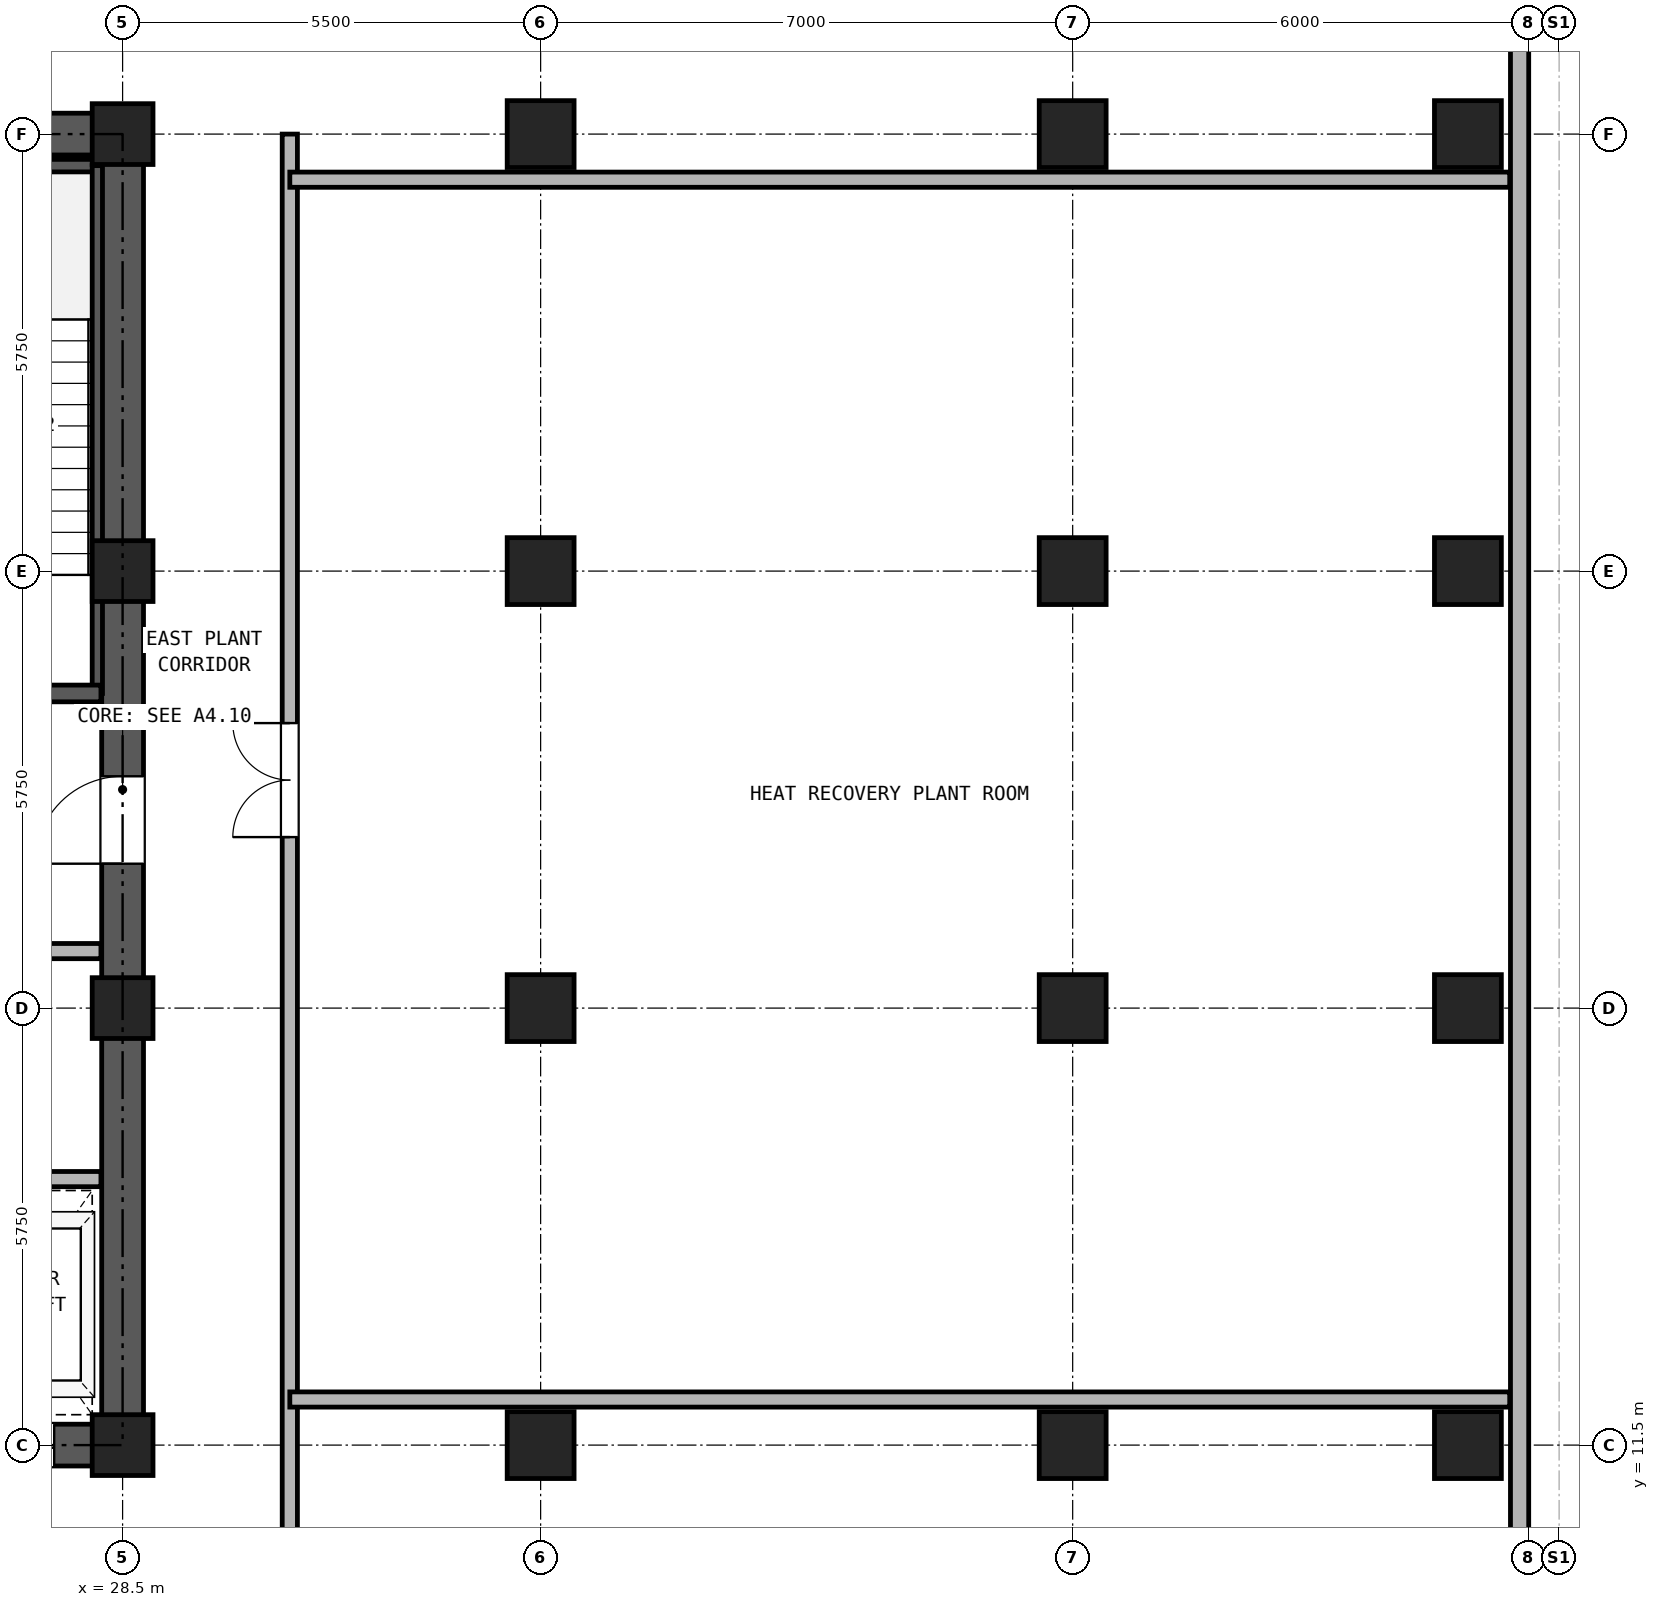
"""IFC4 building model, lengths in metres.
Left out: names, types, materials, properties, quantities, classifications, styles, units other than length and angle.
Written with IfcOpenShell. Run it as: python <this file> out.ifc"""

import sys

from ifc_helpers import new_model, si_unit, direction, frame, frame_2d, origin, origin_2d, place, context, subcontext, project, spatial, rectangle, hollow_rectangle, extrude, source, transform, mapped, element, fill, save


model = new_model("IFC4")
c1 = context("Model", 3, precision=1e-05, world=origin(), true_north=direction((0.0, 1.0)))
c2 = subcontext(c1, "Body", "Model", "MODEL_VIEW")
j1 = project(units=[si_unit("LENGTHUNIT", "METRE"), si_unit("PLANEANGLEUNIT", "RADIAN")], contexts=[c1])
p1 = place(None, origin())
s1 = spatial("IfcSite", under=j1, at=p1, CompositionType="ELEMENT")
p2 = place(p1, origin())
s2 = spatial("IfcBuilding", under=s1, at=p2, CompositionType="ELEMENT")
p3 = place(p2, frame((0.0, 0.0, 143.9)))
s3 = spatial("IfcBuildingStorey", under=s2, at=p3, CompositionType="ELEMENT", Elevation=143.9)
m1 = source(origin(), c2, "Body", "SweptSolid", [
    extrude(hollow_rectangle(XDim=0.88, YDim=0.88, WallThickness=0.05, at=origin_2d()), origin(), (0.0, 0.0, 1.0), 4.25),
])
for number, where, z_axis, x_axis in (
    (1, (46.2, 11.5, 0.0), (0.0, 0.0, 1.0), (1.0, 0.0, 0.0)),
    (2, (46.2, 17.25, 0.0), (0.0, 0.0, 1.0), (1.0, 0.0, 0.0)),
    (3, (46.2, 23.0, 0.0), (0.0, 0.0, 1.0), (1.0, 0.0, 0.0)),
    (4, (46.2, 28.75, 0.0), (0.0, 0.0, 1.0), (1.0, 0.0, 0.0)),
):
    element("IfcColumn", number, at=place(p3, frame(where, z_axis=z_axis, x_axis=x_axis)), inside=s3, PredefinedType="COLUMN", context=c2, shape_type="MappedRepresentation", body=[
        mapped(m1, transform((0.0, 0.0, 0.0), x_axis=(1.0, 0.0, 0.0), y_axis=(0.0, 1.0, 0.0), z_axis=(0.0, 0.0, 1.0), scale=1.0)),
    ])
m2 = source(origin(), c2, "Body", "SweptSolid", [
    extrude(hollow_rectangle(XDim=0.8, YDim=0.8, WallThickness=0.045, at=origin_2d()), origin(), (0.0, 0.0, 1.0), 4.25),
])
for number, where, z_axis, x_axis in (
    (5, (28.5, 11.5, 0.0), (0.0, 0.0, 1.0), (1.0, 0.0, 0.0)),
    (6, (28.5, 17.25, 0.0), (0.0, 0.0, 1.0), (1.0, 0.0, 0.0)),
    (7, (28.5, 23.0, 0.0), (0.0, 0.0, 1.0), (1.0, 0.0, 0.0)),
    (8, (28.5, 28.75, 0.0), (0.0, 0.0, 1.0), (1.0, 0.0, 0.0)),
):
    element("IfcColumn", number, at=place(p3, frame(where, z_axis=z_axis, x_axis=x_axis)), inside=s3, PredefinedType="COLUMN", context=c2, shape_type="MappedRepresentation", body=[
        mapped(m2, transform((0.0, 0.0, 0.0), x_axis=(1.0, 0.0, 0.0), y_axis=(0.0, 1.0, 0.0), z_axis=(0.0, 0.0, 1.0), scale=1.0)),
    ])
for number, where, z_axis, x_axis in (
    (9, (34.0, 11.5, 0.0), (0.0, 0.0, 1.0), (1.0, 0.0, 0.0)),
    (10, (34.0, 17.25, 0.0), (0.0, 0.0, 1.0), (1.0, 0.0, 0.0)),
    (11, (34.0, 23.0, 0.0), (0.0, 0.0, 1.0), (1.0, 0.0, 0.0)),
    (12, (34.0, 28.75, 0.0), (0.0, 0.0, 1.0), (1.0, 0.0, 0.0)),
    (13, (41.0, 11.5, 0.0), (0.0, 0.0, 1.0), (1.0, 0.0, 0.0)),
    (14, (41.0, 17.25, 0.0), (0.0, 0.0, 1.0), (1.0, 0.0, 0.0)),
    (15, (41.0, 23.0, 0.0), (0.0, 0.0, 1.0), (1.0, 0.0, 0.0)),
    (16, (41.0, 28.75, 0.0), (0.0, 0.0, 1.0), (1.0, 0.0, 0.0)),
):
    element("IfcColumn", number, at=place(p3, frame(where, z_axis=z_axis, x_axis=x_axis)), inside=s3, PredefinedType="COLUMN", context=c2, shape_type="MappedRepresentation", body=[
        mapped(m1, transform((0.0, 0.0, 0.0), x_axis=(1.0, 0.0, 0.0), y_axis=(0.0, 1.0, 0.0), z_axis=(0.0, 0.0, 1.0), scale=1.0)),
    ])
p4 = place(p3, frame((46.88, 3.8, 0.0), z_axis=(0.0, 0.0, 1.0), x_axis=(0.0, 1.0, 0.0)))
e17 = element("IfcWall", 17, at=p4, inside=s3, PredefinedType="SOLIDWALL", context=c2, shape_type="SweptSolid", body=[
    extrude(rectangle(XDim=27.7, YDim=0.24, at=frame_2d((13.85, 0.0))), origin(), (0.0, 0.0, 1.0), 4.25),
])
p5 = place(p3, frame((18.225, 11.5, 0.0), z_axis=(0.0, 0.0, 1.0), x_axis=(1.0, 0.0, 0.0)))
e18 = element("IfcWall", 18, at=p5, inside=s3, PredefinedType="SHEAR", context=c2, shape_type="SweptSolid", body=[
    extrude(rectangle(XDim=10.55, YDim=0.55, at=frame_2d((5.275, 0.0))), origin(), (0.0, 0.0, 1.0), 4.25),
])
p6 = place(p5, frame((2.375, 0.0, 0.0)))
e19 = element("IfcOpeningElement", 19, at=p6, cuts=e18, PredefinedType="OPENING", context=c2, shape_type="SweptSolid", body=[
    extrude(rectangle(XDim=0.95, YDim=2.15, at=frame_2d((0.475, 1.075))), frame((0.0, 0.285, 0.0), z_axis=(0.0, -1.0, 0.0), x_axis=(1.0, 0.0, 0.0)), (0.0, 0.0, 1.0), 0.57),
])
p7 = place(p5, frame((5.875, 0.0, 0.0)))
e20 = element("IfcOpeningElement", 20, at=p7, cuts=e18, PredefinedType="OPENING", context=c2, shape_type="SweptSolid", body=[
    extrude(rectangle(XDim=1.1, YDim=2.25, at=frame_2d((0.55, 1.125))), frame((0.0, 0.285, 0.0), z_axis=(0.0, -1.0, 0.0), x_axis=(1.0, 0.0, 0.0)), (0.0, 0.0, 1.0), 0.57),
])
p8 = place(p5, frame((8.275, 0.0, 0.0)))
e21 = element("IfcOpeningElement", 21, at=p8, cuts=e18, PredefinedType="OPENING", context=c2, shape_type="SweptSolid", body=[
    extrude(rectangle(XDim=1.1, YDim=2.25, at=frame_2d((0.55, 1.125))), frame((0.0, 0.285, 0.0), z_axis=(0.0, -1.0, 0.0), x_axis=(1.0, 0.0, 0.0)), (0.0, 0.0, 1.0), 0.57),
])
p9 = place(p3, frame((18.225, 28.75, 0.0), z_axis=(0.0, 0.0, 1.0), x_axis=(1.0, 0.0, 0.0)))
e22 = element("IfcWall", 22, at=p9, inside=s3, PredefinedType="SHEAR", context=c2, shape_type="SweptSolid", body=[
    extrude(rectangle(XDim=10.55, YDim=0.55, at=frame_2d((5.275, 0.0))), origin(), (0.0, 0.0, 1.0), 4.25),
])
p10 = place(p9, frame((4.155, 0.0, 0.0)))
e23 = element("IfcOpeningElement", 23, at=p10, cuts=e22, PredefinedType="OPENING", context=c2, shape_type="SweptSolid", body=[
    extrude(rectangle(XDim=0.9, YDim=2.05, at=frame_2d((0.45, 1.025))), frame((0.0, 0.285, 0.0), z_axis=(0.0, -1.0, 0.0), x_axis=(1.0, 0.0, 0.0)), (0.0, 0.0, 1.0), 0.57),
])
p11 = place(p9, frame((5.695, 0.0, 0.0)))
e24 = element("IfcOpeningElement", 24, at=p11, cuts=e22, PredefinedType="OPENING", context=c2, shape_type="SweptSolid", body=[
    extrude(rectangle(XDim=0.9, YDim=2.05, at=frame_2d((0.45, 1.025))), frame((0.0, 0.285, 0.0), z_axis=(0.0, -1.0, 0.0), x_axis=(1.0, 0.0, 0.0)), (0.0, 0.0, 1.0), 0.57),
])
p12 = place(p3, frame((28.5, 11.775, 0.0), z_axis=(0.0, 0.0, 1.0), x_axis=(0.0, 1.0, 0.0)))
e25 = element("IfcWall", 25, at=p12, inside=s3, PredefinedType="SHEAR", context=c2, shape_type="SweptSolid", body=[
    extrude(rectangle(XDim=16.7, YDim=0.55, at=frame_2d((8.35, 0.0))), origin(), (0.0, 0.0, 1.0), 4.25),
])
p13 = place(p12, frame((7.375, 0.0, 0.0)))
e26 = element("IfcOpeningElement", 26, at=p13, cuts=e25, PredefinedType="OPENING", context=c2, shape_type="SweptSolid", body=[
    extrude(rectangle(XDim=1.15, YDim=2.2, at=frame_2d((0.575, 1.1))), frame((0.0, 0.285, 0.0), z_axis=(0.0, -1.0, 0.0), x_axis=(1.0, 0.0, 0.0)), (0.0, 0.0, 1.0), 0.57),
])
p14 = place(p3, frame((25.13, 28.335, 0.0), z_axis=(0.0, 0.0, 1.0), x_axis=(1.0, 0.0, 0.0)))
e27 = element("IfcWall", 27, at=p14, inside=s3, PredefinedType="PARTITIONING", context=c2, shape_type="SweptSolid", body=[
    extrude(rectangle(XDim=3.085, YDim=0.165, at=frame_2d((1.542, 0.0))), origin(), (0.0, 0.0, 1.0), 4.25),
])
p15 = place(p3, frame((28.167, 21.39, 0.0), z_axis=(0.0, 0.0, 1.0), x_axis=(0.0, 1.0, 0.0)))
e28 = element("IfcWall", 28, at=p15, inside=s3, PredefinedType="PARTITIONING", context=c2, shape_type="SweptSolid", body=[
    extrude(rectangle(XDim=6.945, YDim=0.135, at=frame_2d((3.473, 0.0))), origin(), (0.0, 0.0, 1.0), 4.25),
])
p16 = place(p3, frame((25.13, 21.39, 0.0), z_axis=(0.0, 0.0, 1.0), x_axis=(1.0, 0.0, 0.0)))
e29 = element("IfcWall", 29, at=p16, inside=s3, PredefinedType="SOLIDWALL", context=c2, shape_type="SweptSolid", body=[
    extrude(rectangle(XDim=3.085, YDim=0.22, at=frame_2d((1.542, 0.0))), origin(), (0.0, 0.0, 1.0), 4.25),
])
p17 = place(p16, frame((0.92, 0.0, 0.0)))
e30 = element("IfcOpeningElement", 30, at=p17, cuts=e29, PredefinedType="OPENING", context=c2, shape_type="SweptSolid", body=[
    extrude(rectangle(XDim=1.15, YDim=2.2, at=frame_2d((0.575, 1.1))), frame((0.0, 0.12, 0.0), z_axis=(0.0, -1.0, 0.0), x_axis=(1.0, 0.0, 0.0)), (0.0, 0.0, 1.0), 0.24),
])
p18 = place(p3, frame((18.785, 18.0, 0.0), z_axis=(0.0, 0.0, 1.0), x_axis=(1.0, 0.0, 0.0)))
e31 = element("IfcWall", 31, at=p18, inside=s3, PredefinedType="PARTITIONING", context=c2, shape_type="SweptSolid", body=[
    extrude(rectangle(XDim=9.43, YDim=0.2, at=frame_2d((4.715, 0.0))), origin(), (0.0, 0.0, 1.0), 4.25),
])
p19 = place(p18, frame((0.465, 0.0, 0.0)))
e32 = element("IfcOpeningElement", 32, at=p19, cuts=e31, PredefinedType="OPENING", context=c2, shape_type="SweptSolid", body=[
    extrude(rectangle(XDim=1.3, YDim=2.3, at=frame_2d((0.65, 1.15))), frame((0.0, 0.11, 0.0), z_axis=(0.0, -1.0, 0.0), x_axis=(1.0, 0.0, 0.0)), (0.0, 0.0, 1.0), 0.22),
])
p20 = place(p18, frame((2.565, 0.0, 0.0)))
e33 = element("IfcOpeningElement", 33, at=p20, cuts=e31, PredefinedType="OPENING", context=c2, shape_type="SweptSolid", body=[
    extrude(rectangle(XDim=1.3, YDim=2.3, at=frame_2d((0.65, 1.15))), frame((0.0, 0.11, 0.0), z_axis=(0.0, -1.0, 0.0), x_axis=(1.0, 0.0, 0.0)), (0.0, 0.0, 1.0), 0.22),
])
p21 = place(p18, frame((7.065, 0.0, 0.0)))
e34 = element("IfcOpeningElement", 34, at=p21, cuts=e31, PredefinedType="OPENING", context=c2, shape_type="SweptSolid", body=[
    extrude(rectangle(XDim=1.0, YDim=2.15, at=frame_2d((0.5, 1.075))), frame((0.0, 0.11, 0.0), z_axis=(0.0, -1.0, 0.0), x_axis=(1.0, 0.0, 0.0)), (0.0, 0.0, 1.0), 0.22),
])
p22 = place(p3, frame((18.785, 15.0, 0.0), z_axis=(0.0, 0.0, 1.0), x_axis=(1.0, 0.0, 0.0)))
e35 = element("IfcWall", 35, at=p22, inside=s3, PredefinedType="PARTITIONING", context=c2, shape_type="SweptSolid", body=[
    extrude(rectangle(XDim=9.43, YDim=0.2, at=frame_2d((4.715, 0.0))), origin(), (0.0, 0.0, 1.0), 4.25),
])
p23 = place(p3, frame((30.7, 8.9, 0.0), z_axis=(0.0, 0.0, 1.0), x_axis=(0.0, 1.0, 0.0)))
e36 = element("IfcWall", 36, at=p23, inside=s3, PredefinedType="PARTITIONING", context=c2, shape_type="SweptSolid", body=[
    extrude(rectangle(XDim=19.85, YDim=0.2, at=frame_2d((9.925, 0.0))), origin(), (0.0, 0.0, 1.0), 4.25),
])
p24 = place(p23, frame((10.6, 0.0, 0.0)))
e37 = element("IfcOpeningElement", 37, at=p24, cuts=e36, PredefinedType="OPENING", context=c2, shape_type="SweptSolid", body=[
    extrude(rectangle(XDim=1.5, YDim=2.25, at=frame_2d((0.75, 1.125))), frame((0.0, 0.11, 0.0), z_axis=(0.0, -1.0, 0.0), x_axis=(1.0, 0.0, 0.0)), (0.0, 0.0, 1.0), 0.22),
])
for number, where, z_axis, x_axis in (
    (38, (30.7, 12.1, 0.0), (0.0, 0.0, 1.0), (1.0, 0.0, 0.0)),
    (39, (30.7, 28.15, 0.0), (0.0, 0.0, 1.0), (1.0, 0.0, 0.0)),
):
    element("IfcWall", number, at=place(p3, frame(where, z_axis=z_axis, x_axis=x_axis)), inside=s3, PredefinedType="PARTITIONING", context=c2, shape_type="SweptSolid", body=[
        extrude(rectangle(XDim=16.05, YDim=0.2, at=frame_2d((8.025, 0.0))), origin(), (0.0, 0.0, 1.0), 4.25),
    ])
p25 = place(p13, origin())
e40 = element("IfcDoor", 40, at=p25, inside=s3, OperationType="SINGLE_SWING_LEFT", PredefinedType="DOOR", context=c2, shape_type="SweptSolid", body=[
    extrude(rectangle(XDim=1.15, YDim=2.2, at=frame_2d((0.575, 1.1))), frame((0.0, 0.025, 0.0), z_axis=(0.0, -1.0, 0.0), x_axis=(1.0, 0.0, 0.0)), (0.0, 0.0, 1.0), 0.05),
])
fill(e26, e40)
p26 = place(p8, frame((1.1, 0.0, 0.0), z_axis=(0.0, 0.0, 1.0), x_axis=(-1.0, 0.0, 0.0)))
e41 = element("IfcDoor", 41, at=p26, inside=s3, OperationType="DOUBLE_DOOR_SLIDING", PredefinedType="DOOR", context=c2, shape_type="SweptSolid", body=[
    extrude(rectangle(XDim=1.1, YDim=2.25, at=frame_2d((0.55, 1.125))), frame((0.0, 0.025, 0.0), z_axis=(0.0, -1.0, 0.0), x_axis=(1.0, 0.0, 0.0)), (0.0, 0.0, 1.0), 0.05),
])
fill(e21, e41)
p27 = place(p24, origin())
e42 = element("IfcDoor", 42, at=p27, inside=s3, OperationType="DOUBLE_DOOR_SINGLE_SWING", PredefinedType="DOOR", context=c2, shape_type="SweptSolid", body=[
    extrude(rectangle(XDim=1.5, YDim=2.25, at=frame_2d((0.75, 1.125))), frame((0.0, 0.025, 0.0), z_axis=(0.0, -1.0, 0.0), x_axis=(1.0, 0.0, 0.0)), (0.0, 0.0, 1.0), 0.05),
])
fill(e37, e42)
save(model, sys.argv[1])
